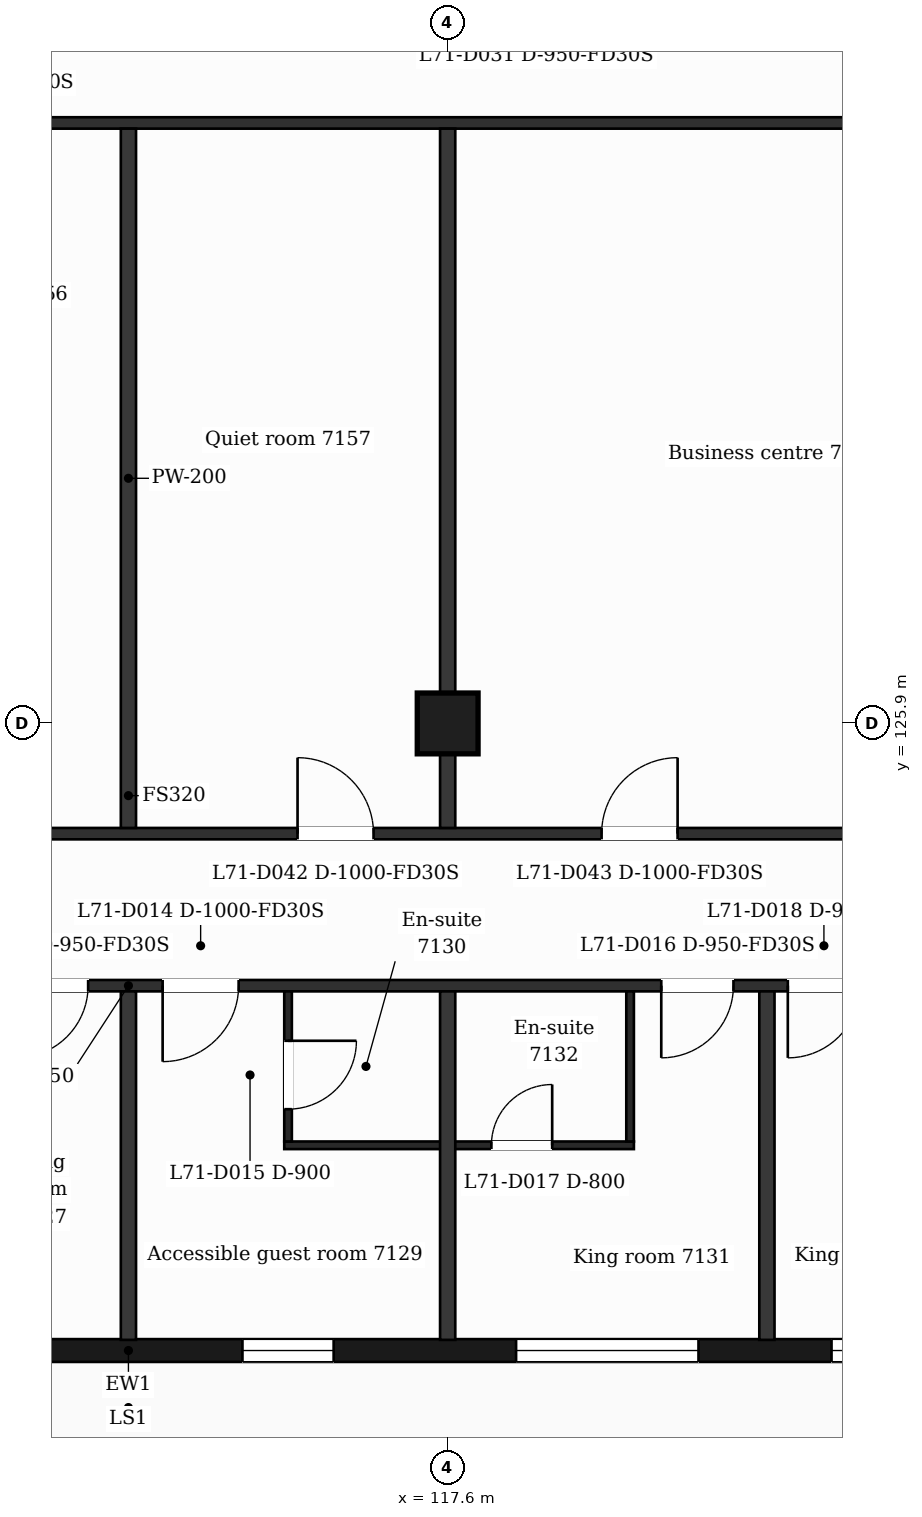
"""IFC4 building model, lengths in metres.
Left out: names, types, materials, properties, quantities, classifications, styles, units other than length and angle.
Written with IfcOpenShell. Run it as: python <this file> out.ifc"""

import sys

from ifc_helpers import new_model, si_unit, direction, frame, frame_2d, origin, origin_2d, place, context, subcontext, project, spatial, rectangle, extrude, element, fill, save


model = new_model("IFC4")
c1 = context("Model", 3, precision=1e-05, world=origin(), true_north=direction((0.0, 1.0)))
c2 = subcontext(c1, "Body", "Model", "MODEL_VIEW")
j1 = project(units=[si_unit("LENGTHUNIT", "METRE"), si_unit("PLANEANGLEUNIT", "RADIAN")], contexts=[c1])
p1 = place(None, origin())
s1 = spatial("IfcSite", under=j1, at=p1, CompositionType="ELEMENT")
p2 = place(p1, origin())
s2 = spatial("IfcBuilding", under=s1, at=p2, CompositionType="ELEMENT")
p3 = place(p2, frame((0.0, 0.0, 292.3)))
s3 = spatial("IfcBuildingStorey", under=s2, at=p3, CompositionType="ELEMENT", Elevation=292.3)
p4 = place(p3, frame((117.6, 125.9, 0.0), z_axis=(0.0, 0.0, 1.0), x_axis=(1.0, 0.0, 0.0)))
e1 = element("IfcColumn", 1, at=p4, inside=s3, PredefinedType="COLUMN", context=c2, shape_type="SweptSolid", body=[
    extrude(rectangle(XDim=0.8, YDim=0.8, at=origin_2d()), origin(), (0.0, 0.0, 1.0), 3.7),
])
p5 = place(p3, frame((100.8, 117.65, 0.0), z_axis=(0.0, 0.0, 1.0), x_axis=(1.0, 0.0, 0.0)))
e2 = element("IfcWall", 2, at=p5, inside=s3, PredefinedType="SOLIDWALL", context=c2, shape_type="SweptSolid", body=[
    extrude(rectangle(XDim=25.2, YDim=0.3, at=frame_2d((12.6, 0.0))), origin(), (0.0, 0.0, 1.0), 3.38),
])
p6 = place(p5, frame((0.95, 0.0, 0.9)))
e3 = element("IfcOpeningElement", 3, at=p6, cuts=e2, PredefinedType="OPENING", context=c2, shape_type="SweptSolid", body=[
    extrude(rectangle(XDim=2.4, YDim=2.1, at=frame_2d((1.2, 1.05))), frame((0.0, 0.16, 0.0), z_axis=(0.0, -1.0, 0.0), x_axis=(1.0, 0.0, 0.0)), (0.0, 0.0, 1.0), 0.32),
])
p7 = place(p5, frame((5.1, 0.0, 0.9)))
e4 = element("IfcOpeningElement", 4, at=p7, cuts=e2, PredefinedType="OPENING", context=c2, shape_type="SweptSolid", body=[
    extrude(rectangle(XDim=2.4, YDim=2.1, at=frame_2d((1.2, 1.05))), frame((0.0, 0.16, 0.0), z_axis=(0.0, -1.0, 0.0), x_axis=(1.0, 0.0, 0.0)), (0.0, 0.0, 1.0), 0.32),
])
p8 = place(p5, frame((9.9, 0.0, 0.0)))
e5 = element("IfcOpeningElement", 5, at=p8, cuts=e2, PredefinedType="OPENING", context=c2, shape_type="SweptSolid", body=[
    extrude(rectangle(XDim=1.2, YDim=2.4, at=frame_2d((0.6, 1.2))), frame((0.0, 0.16, 0.0), z_axis=(0.0, -1.0, 0.0), x_axis=(1.0, 0.0, 0.0)), (0.0, 0.0, 1.0), 0.32),
])
p9 = place(p5, frame((14.1, 0.0, 0.9)))
e6 = element("IfcOpeningElement", 6, at=p9, cuts=e2, PredefinedType="OPENING", context=c2, shape_type="SweptSolid", body=[
    extrude(rectangle(XDim=1.2, YDim=2.1, at=frame_2d((0.6, 1.05))), frame((0.0, 0.16, 0.0), z_axis=(0.0, -1.0, 0.0), x_axis=(1.0, 0.0, 0.0)), (0.0, 0.0, 1.0), 0.32),
])
p10 = place(p5, frame((17.7, 0.0, 0.9)))
e7 = element("IfcOpeningElement", 7, at=p10, cuts=e2, PredefinedType="OPENING", context=c2, shape_type="SweptSolid", body=[
    extrude(rectangle(XDim=2.4, YDim=2.1, at=frame_2d((1.2, 1.05))), frame((0.0, 0.16, 0.0), z_axis=(0.0, -1.0, 0.0), x_axis=(1.0, 0.0, 0.0)), (0.0, 0.0, 1.0), 0.32),
])
p11 = place(p5, frame((21.85, 0.0, 0.9)))
e8 = element("IfcOpeningElement", 8, at=p11, cuts=e2, PredefinedType="OPENING", context=c2, shape_type="SweptSolid", body=[
    extrude(rectangle(XDim=2.4, YDim=2.1, at=frame_2d((1.2, 1.05))), frame((0.0, 0.16, 0.0), z_axis=(0.0, -1.0, 0.0), x_axis=(1.0, 0.0, 0.0)), (0.0, 0.0, 1.0), 0.32),
])
p12 = place(p3, frame((115.45, 120.35, 0.0), z_axis=(0.0, 0.0, 1.0), x_axis=(1.0, 0.0, 0.0)))
e9 = element("IfcWall", 9, at=p12, inside=s3, PredefinedType="PARTITIONING", context=c2, shape_type="SweptSolid", body=[
    extrude(rectangle(XDim=4.6, YDim=0.1, at=frame_2d((2.3, 0.0))), origin(), (0.0, 0.0, 1.0), 3.38),
])
p13 = place(p12, frame((2.725, 0.0, 0.0)))
e10 = element("IfcOpeningElement", 10, at=p13, cuts=e9, PredefinedType="OPENING", context=c2, shape_type="SweptSolid", body=[
    extrude(rectangle(XDim=0.8, YDim=2.1, at=frame_2d((0.4, 1.05))), frame((0.0, 0.06, 0.0), z_axis=(0.0, -1.0, 0.0), x_axis=(1.0, 0.0, 0.0)), (0.0, 0.0, 1.0), 0.12),
])
p14 = place(p3, frame((100.8, 122.45, 0.0), z_axis=(0.0, 0.0, 1.0), x_axis=(1.0, 0.0, 0.0)))
e11 = element("IfcWall", 11, at=p14, inside=s3, PredefinedType="PARTITIONING", context=c2, shape_type="SweptSolid", body=[
    extrude(rectangle(XDim=25.2, YDim=0.15, at=frame_2d((12.6, 0.0))), origin(), (0.0, 0.0, 1.0), 3.38),
])
p15 = place(p14, frame((1.6, 0.0, 0.0)))
e12 = element("IfcOpeningElement", 12, at=p15, cuts=e11, PredefinedType="OPENING", context=c2, shape_type="SweptSolid", body=[
    extrude(rectangle(XDim=1.0, YDim=2.1, at=frame_2d((0.5, 1.05))), frame((0.0, 0.085, 0.0), z_axis=(0.0, -1.0, 0.0), x_axis=(1.0, 0.0, 0.0)), (0.0, 0.0, 1.0), 0.17),
])
p16 = place(p14, frame((11.12, 0.0, 0.0)))
e13 = element("IfcOpeningElement", 13, at=p16, cuts=e11, PredefinedType="OPENING", context=c2, shape_type="SweptSolid", body=[
    extrude(rectangle(XDim=0.95, YDim=2.1, at=frame_2d((0.475, 1.05))), frame((0.0, 0.085, 0.0), z_axis=(0.0, -1.0, 0.0), x_axis=(1.0, 0.0, 0.0)), (0.0, 0.0, 1.0), 0.17),
])
p17 = place(p14, frame((13.05, 0.0, 0.0)))
e14 = element("IfcOpeningElement", 14, at=p17, cuts=e11, PredefinedType="OPENING", context=c2, shape_type="SweptSolid", body=[
    extrude(rectangle(XDim=1.0, YDim=2.1, at=frame_2d((0.5, 1.05))), frame((0.0, 0.085, 0.0), z_axis=(0.0, -1.0, 0.0), x_axis=(1.0, 0.0, 0.0)), (0.0, 0.0, 1.0), 0.17),
])
p18 = place(p14, frame((19.61, 0.0, 0.0)))
e15 = element("IfcOpeningElement", 15, at=p18, cuts=e11, PredefinedType="OPENING", context=c2, shape_type="SweptSolid", body=[
    extrude(rectangle(XDim=0.95, YDim=2.1, at=frame_2d((0.475, 1.05))), frame((0.0, 0.085, 0.0), z_axis=(0.0, -1.0, 0.0), x_axis=(1.0, 0.0, 0.0)), (0.0, 0.0, 1.0), 0.17),
])
p19 = place(p14, frame((21.275, 0.0, 0.0)))
e16 = element("IfcOpeningElement", 16, at=p19, cuts=e11, PredefinedType="OPENING", context=c2, shape_type="SweptSolid", body=[
    extrude(rectangle(XDim=0.95, YDim=2.1, at=frame_2d((0.475, 1.05))), frame((0.0, 0.085, 0.0), z_axis=(0.0, -1.0, 0.0), x_axis=(1.0, 0.0, 0.0)), (0.0, 0.0, 1.0), 0.17),
])
p20 = place(p3, frame((100.8, 124.45, 0.0), z_axis=(0.0, 0.0, 1.0), x_axis=(1.0, 0.0, 0.0)))
e17 = element("IfcWall", 17, at=p20, inside=s3, PredefinedType="PARTITIONING", context=c2, shape_type="SweptSolid", body=[
    extrude(rectangle(XDim=25.2, YDim=0.15, at=frame_2d((12.6, 0.0))), origin(), (0.0, 0.0, 1.0), 3.38),
])
p21 = place(p20, frame((1.85, 0.0, 0.0)))
e18 = element("IfcOpeningElement", 18, at=p21, cuts=e17, PredefinedType="OPENING", context=c2, shape_type="SweptSolid", body=[
    extrude(rectangle(XDim=1.0, YDim=2.1, at=frame_2d((0.5, 1.05))), frame((0.0, 0.085, 0.0), z_axis=(0.0, -1.0, 0.0), x_axis=(1.0, 0.0, 0.0)), (0.0, 0.0, 1.0), 0.17),
])
p22 = place(p20, frame((6.425, 0.0, 0.0)))
e19 = element("IfcOpeningElement", 19, at=p22, cuts=e17, PredefinedType="OPENING", context=c2, shape_type="SweptSolid", body=[
    extrude(rectangle(XDim=1.0, YDim=2.1, at=frame_2d((0.5, 1.05))), frame((0.0, 0.085, 0.0), z_axis=(0.0, -1.0, 0.0), x_axis=(1.0, 0.0, 0.0)), (0.0, 0.0, 1.0), 0.17),
])
p23 = place(p20, frame((9.4, 0.0, 0.0)))
e20 = element("IfcOpeningElement", 20, at=p23, cuts=e17, PredefinedType="OPENING", context=c2, shape_type="SweptSolid", body=[
    extrude(rectangle(XDim=1.0, YDim=2.1, at=frame_2d((0.5, 1.05))), frame((0.0, 0.085, 0.0), z_axis=(0.0, -1.0, 0.0), x_axis=(1.0, 0.0, 0.0)), (0.0, 0.0, 1.0), 0.17),
])
p24 = place(p20, frame((14.825, 0.0, 0.0)))
e21 = element("IfcOpeningElement", 21, at=p24, cuts=e17, PredefinedType="OPENING", context=c2, shape_type="SweptSolid", body=[
    extrude(rectangle(XDim=1.0, YDim=2.1, at=frame_2d((0.5, 1.05))), frame((0.0, 0.085, 0.0), z_axis=(0.0, -1.0, 0.0), x_axis=(1.0, 0.0, 0.0)), (0.0, 0.0, 1.0), 0.17),
])
p25 = place(p20, frame((18.825, 0.0, 0.0)))
e22 = element("IfcOpeningElement", 22, at=p25, cuts=e17, PredefinedType="OPENING", context=c2, shape_type="SweptSolid", body=[
    extrude(rectangle(XDim=1.0, YDim=2.1, at=frame_2d((0.5, 1.05))), frame((0.0, 0.085, 0.0), z_axis=(0.0, -1.0, 0.0), x_axis=(1.0, 0.0, 0.0)), (0.0, 0.0, 1.0), 0.17),
])
p26 = place(p3, frame((100.725, 133.8, 0.0), z_axis=(0.0, 0.0, 1.0), x_axis=(1.0, 0.0, 0.0)))
e23 = element("IfcWall", 23, at=p26, inside=s3, PredefinedType="PARTITIONING", context=c2, shape_type="SweptSolid", body=[
    extrude(rectangle(XDim=25.35, YDim=0.15, at=frame_2d((12.675, 0.0))), origin(), (0.0, 0.0, 1.0), 3.38),
])
p27 = place(p26, frame((9.825, 0.0, 0.0)))
e24 = element("IfcOpeningElement", 24, at=p27, cuts=e23, PredefinedType="OPENING", context=c2, shape_type="SweptSolid", body=[
    extrude(rectangle(XDim=1.0, YDim=2.1, at=frame_2d((0.5, 1.05))), frame((0.0, 0.085, 0.0), z_axis=(0.0, -1.0, 0.0), x_axis=(1.0, 0.0, 0.0)), (0.0, 0.0, 1.0), 0.17),
])
p28 = place(p3, frame((113.4, 117.79, 0.0), z_axis=(0.0, 0.0, 1.0), x_axis=(0.0, 1.0, 0.0)))
e25 = element("IfcWall", 25, at=p28, inside=s3, PredefinedType="PARTITIONING", context=c2, shape_type="SweptSolid", body=[
    extrude(rectangle(XDim=4.585, YDim=0.2, at=frame_2d((2.292, 0.0))), origin(), (0.0, 0.0, 1.0), 3.38),
])
p29 = place(p3, frame((113.4, 124.525, 0.0), z_axis=(0.0, 0.0, 1.0), x_axis=(0.0, 1.0, 0.0)))
e26 = element("IfcWall", 26, at=p29, inside=s3, PredefinedType="PARTITIONING", context=c2, shape_type="SweptSolid", body=[
    extrude(rectangle(XDim=9.2, YDim=0.2, at=frame_2d((4.6, 0.0))), origin(), (0.0, 0.0, 1.0), 3.38),
])
p30 = place(p3, frame((115.5, 120.4, 0.0), z_axis=(0.0, 0.0, 1.0), x_axis=(0.0, 1.0, 0.0)))
e27 = element("IfcWall", 27, at=p30, inside=s3, PredefinedType="PARTITIONING", context=c2, shape_type="SweptSolid", body=[
    extrude(rectangle(XDim=1.975, YDim=0.1, at=frame_2d((0.988, 0.0))), origin(), (0.0, 0.0, 1.0), 3.38),
])
p31 = place(p30, frame((0.425, 0.0, 0.0)))
e28 = element("IfcOpeningElement", 28, at=p31, cuts=e27, PredefinedType="OPENING", context=c2, shape_type="SweptSolid", body=[
    extrude(rectangle(XDim=0.9, YDim=2.1, at=frame_2d((0.45, 1.05))), frame((0.0, 0.06, 0.0), z_axis=(0.0, -1.0, 0.0), x_axis=(1.0, 0.0, 0.0)), (0.0, 0.0, 1.0), 0.12),
])
p32 = place(p3, frame((117.6, 117.79, 0.0), z_axis=(0.0, 0.0, 1.0), x_axis=(0.0, 1.0, 0.0)))
e29 = element("IfcWall", 29, at=p32, inside=s3, PredefinedType="PARTITIONING", context=c2, shape_type="SweptSolid", body=[
    extrude(rectangle(XDim=4.585, YDim=0.2, at=frame_2d((2.292, 0.0))), origin(), (0.0, 0.0, 1.0), 3.38),
])
p33 = place(p3, frame((117.6, 124.525, 0.0), z_axis=(0.0, 0.0, 1.0), x_axis=(0.0, 1.0, 0.0)))
e30 = element("IfcWall", 30, at=p33, inside=s3, PredefinedType="PARTITIONING", context=c2, shape_type="SweptSolid", body=[
    extrude(rectangle(XDim=9.2, YDim=0.2, at=frame_2d((4.6, 0.0))), origin(), (0.0, 0.0, 1.0), 3.38),
])
p34 = place(p3, frame((120.0, 120.4, 0.0), z_axis=(0.0, 0.0, 1.0), x_axis=(0.0, 1.0, 0.0)))
e31 = element("IfcWall", 31, at=p34, inside=s3, PredefinedType="PARTITIONING", context=c2, shape_type="SweptSolid", body=[
    extrude(rectangle(XDim=1.975, YDim=0.1, at=frame_2d((0.988, 0.0))), origin(), (0.0, 0.0, 1.0), 3.38),
])
p35 = place(p3, frame((121.8, 117.79, 0.0), z_axis=(0.0, 0.0, 1.0), x_axis=(0.0, 1.0, 0.0)))
e32 = element("IfcWall", 32, at=p35, inside=s3, PredefinedType="PARTITIONING", context=c2, shape_type="SweptSolid", body=[
    extrude(rectangle(XDim=4.585, YDim=0.2, at=frame_2d((2.292, 0.0))), origin(), (0.0, 0.0, 1.0), 3.38),
])
p36 = place(p9, origin())
e33 = element("IfcWindow", 33, at=p36, inside=s3, PartitioningType="SINGLE_PANEL", PredefinedType="WINDOW", context=c2, shape_type="SweptSolid", body=[
    extrude(rectangle(XDim=1.2, YDim=2.1, at=frame_2d((0.6, 1.05))), frame((0.0, 0.03, 0.0), z_axis=(0.0, -1.0, 0.0), x_axis=(1.0, 0.0, 0.0)), (0.0, 0.0, 1.0), 0.06),
])
fill(e6, e33)
p37 = place(p10, origin())
e34 = element("IfcWindow", 34, at=p37, inside=s3, PartitioningType="SINGLE_PANEL", PredefinedType="WINDOW", context=c2, shape_type="SweptSolid", body=[
    extrude(rectangle(XDim=2.4, YDim=2.1, at=frame_2d((1.2, 1.05))), frame((0.0, 0.03, 0.0), z_axis=(0.0, -1.0, 0.0), x_axis=(1.0, 0.0, 0.0)), (0.0, 0.0, 1.0), 0.06),
])
fill(e7, e34)
p38 = place(p11, origin())
e35 = element("IfcWindow", 35, at=p38, inside=s3, PartitioningType="SINGLE_PANEL", PredefinedType="WINDOW", context=c2, shape_type="SweptSolid", body=[
    extrude(rectangle(XDim=2.4, YDim=2.1, at=frame_2d((1.2, 1.05))), frame((0.0, 0.03, 0.0), z_axis=(0.0, -1.0, 0.0), x_axis=(1.0, 0.0, 0.0)), (0.0, 0.0, 1.0), 0.06),
])
fill(e8, e35)
p39 = place(p16, origin())
e36 = element("IfcDoor", 36, at=p39, inside=s3, OperationType="SINGLE_SWING_LEFT", PredefinedType="DOOR", context=c2, shape_type="SweptSolid", body=[
    extrude(rectangle(XDim=0.95, YDim=2.1, at=frame_2d((0.475, 1.05))), frame((0.0, 0.025, 0.0), z_axis=(0.0, -1.0, 0.0), x_axis=(1.0, 0.0, 0.0)), (0.0, 0.0, 1.0), 0.05),
])
fill(e13, e36)
p40 = place(p17, origin())
e37 = element("IfcDoor", 37, at=p40, inside=s3, OperationType="SINGLE_SWING_LEFT", PredefinedType="DOOR", context=c2, shape_type="SweptSolid", body=[
    extrude(rectangle(XDim=1.0, YDim=2.1, at=frame_2d((0.5, 1.05))), frame((0.0, 0.025, 0.0), z_axis=(0.0, -1.0, 0.0), x_axis=(1.0, 0.0, 0.0)), (0.0, 0.0, 1.0), 0.05),
])
fill(e14, e37)
p41 = place(p31, origin())
e38 = element("IfcDoor", 38, at=p41, inside=s3, OperationType="SINGLE_SWING_RIGHT", PredefinedType="DOOR", context=c2, shape_type="SweptSolid", body=[
    extrude(rectangle(XDim=0.9, YDim=2.1, at=frame_2d((0.45, 1.05))), frame((0.0, 0.025, 0.0), z_axis=(0.0, -1.0, 0.0), x_axis=(1.0, 0.0, 0.0)), (0.0, 0.0, 1.0), 0.05),
])
fill(e28, e38)
p42 = place(p18, origin())
e39 = element("IfcDoor", 39, at=p42, inside=s3, OperationType="SINGLE_SWING_LEFT", PredefinedType="DOOR", context=c2, shape_type="SweptSolid", body=[
    extrude(rectangle(XDim=0.95, YDim=2.1, at=frame_2d((0.475, 1.05))), frame((0.0, 0.025, 0.0), z_axis=(0.0, -1.0, 0.0), x_axis=(1.0, 0.0, 0.0)), (0.0, 0.0, 1.0), 0.05),
])
fill(e15, e39)
p43 = place(p13, origin())
e40 = element("IfcDoor", 40, at=p43, inside=s3, OperationType="SINGLE_SWING_RIGHT", PredefinedType="DOOR", context=c2, shape_type="SweptSolid", body=[
    extrude(rectangle(XDim=0.8, YDim=2.1, at=frame_2d((0.4, 1.05))), frame((0.0, 0.025, 0.0), z_axis=(0.0, -1.0, 0.0), x_axis=(1.0, 0.0, 0.0)), (0.0, 0.0, 1.0), 0.05),
])
fill(e10, e40)
p44 = place(p19, origin())
e41 = element("IfcDoor", 41, at=p44, inside=s3, OperationType="SINGLE_SWING_LEFT", PredefinedType="DOOR", context=c2, shape_type="SweptSolid", body=[
    extrude(rectangle(XDim=0.95, YDim=2.1, at=frame_2d((0.475, 1.05))), frame((0.0, 0.025, 0.0), z_axis=(0.0, -1.0, 0.0), x_axis=(1.0, 0.0, 0.0)), (0.0, 0.0, 1.0), 0.05),
])
fill(e16, e41)
p45 = place(p24, origin())
e42 = element("IfcDoor", 42, at=p45, inside=s3, OperationType="SINGLE_SWING_LEFT", PredefinedType="DOOR", context=c2, shape_type="SweptSolid", body=[
    extrude(rectangle(XDim=1.0, YDim=2.1, at=frame_2d((0.5, 1.05))), frame((0.0, 0.025, 0.0), z_axis=(0.0, -1.0, 0.0), x_axis=(1.0, 0.0, 0.0)), (0.0, 0.0, 1.0), 0.05),
])
fill(e21, e42)
p46 = place(p25, origin())
e43 = element("IfcDoor", 43, at=p46, inside=s3, OperationType="SINGLE_SWING_RIGHT", PredefinedType="DOOR", context=c2, shape_type="SweptSolid", body=[
    extrude(rectangle(XDim=1.0, YDim=2.1, at=frame_2d((0.5, 1.05))), frame((0.0, 0.025, 0.0), z_axis=(0.0, -1.0, 0.0), x_axis=(1.0, 0.0, 0.0)), (0.0, 0.0, 1.0), 0.05),
])
fill(e22, e43)
save(model, sys.argv[1])
